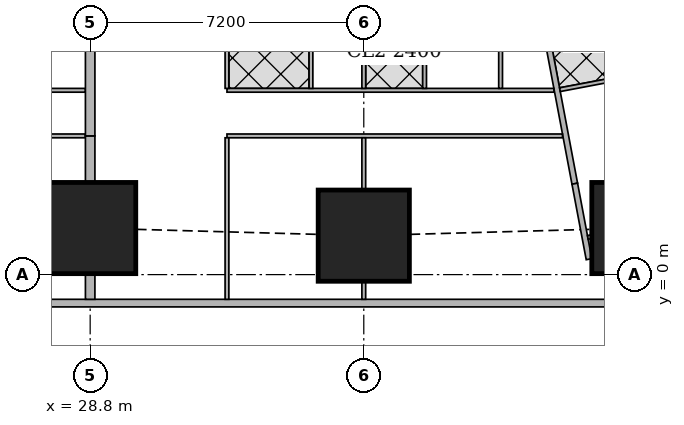
"""IFC4 building model, lengths in metres.
Left out: names, types, materials, properties, quantities, classifications, styles, units other than length and angle.
Written with IfcOpenShell. Run it as: python <this file> out.ifc"""

import sys

from ifc_helpers import new_model, si_unit, direction, frame, frame_2d, origin, origin_2d, place, context, subcontext, project, spatial, rectangle, extrude, element, fill, save


model = new_model("IFC4")
c1 = context("Model", 3, precision=1e-05, world=origin(), true_north=direction((0.0, 1.0)))
c2 = subcontext(c1, "Body", "Model", "MODEL_VIEW")
j1 = project(units=[si_unit("LENGTHUNIT", "METRE"), si_unit("PLANEANGLEUNIT", "RADIAN")], contexts=[c1])
p1 = place(None, origin())
s1 = spatial("IfcSite", under=j1, at=p1, CompositionType="ELEMENT")
p2 = place(p1, origin())
s2 = spatial("IfcBuilding", under=s1, at=p2, CompositionType="ELEMENT")
p3 = place(p2, frame((0.0, 0.0, 193.7)))
s3 = spatial("IfcBuildingStorey", under=s2, at=p3, CompositionType="ELEMENT", Elevation=193.7)
for number, where, z_axis, x_axis in (
    (1, (28.8, 1.225, 0.0), (0.0, 0.0, 1.0), (1.0, 0.0, 0.0)),
    (2, (36.0, 1.025, 0.0), (0.0, 0.0, 1.0), (1.0, 0.0, 0.0)),
    (3, (43.2, 1.225, 0.0), (0.0, 0.0, 1.0), (1.0, 0.0, 0.0)),
):
    element("IfcColumn", number, at=place(p3, frame(where, z_axis=z_axis, x_axis=x_axis)), inside=s3, PredefinedType="COLUMN", context=c2, shape_type="SweptSolid", body=[
        extrude(rectangle(XDim=2.4, YDim=2.4, at=origin_2d()), origin(), (0.0, 0.0, 1.0), 3.75),
    ])
p4 = place(p3, frame((7.363, -0.75, 0.0), z_axis=(0.0, 0.0, 1.0), x_axis=(1.0, 0.0, 0.0)))
e4 = element("IfcWall", 4, at=p4, inside=s3, PredefinedType="SOLIDWALL", context=c2, shape_type="SweptSolid", body=[
    extrude(rectangle(XDim=40.428, YDim=0.2, at=frame_2d((20.214, 0.0))), origin(), (0.0, 0.0, 1.0), 3.5),
])
p5 = place(p4, frame((2.319, 0.0, 0.9)))
e5 = element("IfcOpeningElement", 5, at=p5, cuts=e4, PredefinedType="OPENING", context=c2, shape_type="SweptSolid", body=[
    extrude(rectangle(XDim=2.4, YDim=1.5, at=frame_2d((1.2, 0.75))), frame((0.0, 0.11, 0.0), z_axis=(0.0, -1.0, 0.0), x_axis=(1.0, 0.0, 0.0)), (0.0, 0.0, 1.0), 0.22),
])
p6 = place(p4, frame((7.937, 0.0, 0.9)))
e6 = element("IfcOpeningElement", 6, at=p6, cuts=e4, PredefinedType="OPENING", context=c2, shape_type="SweptSolid", body=[
    extrude(rectangle(XDim=1.8, YDim=1.5, at=frame_2d((0.9, 0.75))), frame((0.0, 0.11, 0.0), z_axis=(0.0, -1.0, 0.0), x_axis=(1.0, 0.0, 0.0)), (0.0, 0.0, 1.0), 0.22),
])
p7 = place(p4, frame((11.537, 0.0, 0.9)))
e7 = element("IfcOpeningElement", 7, at=p7, cuts=e4, PredefinedType="OPENING", context=c2, shape_type="SweptSolid", body=[
    extrude(rectangle(XDim=1.8, YDim=1.5, at=frame_2d((0.9, 0.75))), frame((0.0, 0.11, 0.0), z_axis=(0.0, -1.0, 0.0), x_axis=(1.0, 0.0, 0.0)), (0.0, 0.0, 1.0), 0.22),
])
p8 = place(p4, frame((15.137, 0.0, 0.9)))
e8 = element("IfcOpeningElement", 8, at=p8, cuts=e4, PredefinedType="OPENING", context=c2, shape_type="SweptSolid", body=[
    extrude(rectangle(XDim=1.8, YDim=1.5, at=frame_2d((0.9, 0.75))), frame((0.0, 0.11, 0.0), z_axis=(0.0, -1.0, 0.0), x_axis=(1.0, 0.0, 0.0)), (0.0, 0.0, 1.0), 0.22),
])
p9 = place(p4, frame((18.737, 0.0, 0.9)))
e9 = element("IfcOpeningElement", 9, at=p9, cuts=e4, PredefinedType="OPENING", context=c2, shape_type="SweptSolid", body=[
    extrude(rectangle(XDim=1.8, YDim=1.5, at=frame_2d((0.9, 0.75))), frame((0.0, 0.11, 0.0), z_axis=(0.0, -1.0, 0.0), x_axis=(1.0, 0.0, 0.0)), (0.0, 0.0, 1.0), 0.22),
])
p10 = place(p4, frame((22.337, 0.0, 0.9)))
e10 = element("IfcOpeningElement", 10, at=p10, cuts=e4, PredefinedType="OPENING", context=c2, shape_type="SweptSolid", body=[
    extrude(rectangle(XDim=1.8, YDim=1.5, at=frame_2d((0.9, 0.75))), frame((0.0, 0.11, 0.0), z_axis=(0.0, -1.0, 0.0), x_axis=(1.0, 0.0, 0.0)), (0.0, 0.0, 1.0), 0.22),
])
p11 = place(p4, frame((25.937, 0.0, 0.9)))
e11 = element("IfcOpeningElement", 11, at=p11, cuts=e4, PredefinedType="OPENING", context=c2, shape_type="SweptSolid", body=[
    extrude(rectangle(XDim=1.8, YDim=1.5, at=frame_2d((0.9, 0.75))), frame((0.0, 0.11, 0.0), z_axis=(0.0, -1.0, 0.0), x_axis=(1.0, 0.0, 0.0)), (0.0, 0.0, 1.0), 0.22),
])
p12 = place(p4, frame((29.537, 0.0, 0.9)))
e12 = element("IfcOpeningElement", 12, at=p12, cuts=e4, PredefinedType="OPENING", context=c2, shape_type="SweptSolid", body=[
    extrude(rectangle(XDim=1.8, YDim=1.5, at=frame_2d((0.9, 0.75))), frame((0.0, 0.11, 0.0), z_axis=(0.0, -1.0, 0.0), x_axis=(1.0, 0.0, 0.0)), (0.0, 0.0, 1.0), 0.22),
])
p13 = place(p4, frame((33.137, 0.0, 0.9)))
e13 = element("IfcOpeningElement", 13, at=p13, cuts=e4, PredefinedType="OPENING", context=c2, shape_type="SweptSolid", body=[
    extrude(rectangle(XDim=1.8, YDim=1.5, at=frame_2d((0.9, 0.75))), frame((0.0, 0.11, 0.0), z_axis=(0.0, -1.0, 0.0), x_axis=(1.0, 0.0, 0.0)), (0.0, 0.0, 1.0), 0.22),
])
p14 = place(p3, frame((33.933, 42.73, 0.0), z_axis=(0.0, 0.0, 1.0), x_axis=(0.185595417643, -0.982626246825, 0.0)))
e14 = element("IfcWall", 14, at=p14, inside=s3, PredefinedType="SOLIDWALL", context=c2, shape_type="SweptSolid", body=[
    extrude(rectangle(XDim=41.051, YDim=0.15, at=frame_2d((20.525, 0.0))), origin(), (0.0, 0.0, 1.0), 2.5),
])
p15 = place(p14, frame((16.082, 0.0, 0.0)))
e15 = element("IfcOpeningElement", 15, at=p15, cuts=e14, PredefinedType="OPENING", context=c2, shape_type="SweptSolid", body=[
    extrude(rectangle(XDim=1.0, YDim=2.1, at=frame_2d((0.5, 1.05))), frame((0.0, 0.085, 0.0), z_axis=(0.0, -1.0, 0.0), x_axis=(1.0, 0.0, 0.0)), (0.0, 0.0, 1.0), 0.17),
])
p16 = place(p14, frame((19.898, 0.0, 0.0)))
e16 = element("IfcOpeningElement", 16, at=p16, cuts=e14, PredefinedType="OPENING", context=c2, shape_type="SweptSolid", body=[
    extrude(rectangle(XDim=1.0, YDim=2.1, at=frame_2d((0.5, 1.05))), frame((0.0, 0.085, 0.0), z_axis=(0.0, -1.0, 0.0), x_axis=(1.0, 0.0, 0.0)), (0.0, 0.0, 1.0), 0.17),
])
p17 = place(p14, frame((30.862, 0.0, 0.0)))
e17 = element("IfcOpeningElement", 17, at=p17, cuts=e14, PredefinedType="OPENING", context=c2, shape_type="SweptSolid", body=[
    extrude(rectangle(XDim=1.0, YDim=2.1, at=frame_2d((0.5, 1.05))), frame((0.0, 0.085, 0.0), z_axis=(0.0, -1.0, 0.0), x_axis=(1.0, 0.0, 0.0)), (0.0, 0.0, 1.0), 0.17),
])
p18 = place(p3, frame((41.552, 2.392, 0.0), z_axis=(0.0, 0.0, 1.0), x_axis=(0.185535500323, -0.982637561932, 0.0)))
e18 = element("IfcWall", 18, at=p18, inside=s3, PredefinedType="SOLIDWALL", context=c2, shape_type="SweptSolid", body=[
    extrude(rectangle(XDim=2.021, YDim=0.15, at=frame_2d((1.011, 0.0))), origin(), (0.0, 0.0, 1.0), 2.05),
])
p19 = place(p3, frame((28.675, 3.65, 0.0), z_axis=(0.0, 0.0, 1.0), x_axis=(-1.0, 0.0, 0.0)))
e19 = element("IfcWall", 19, at=p19, inside=s3, PredefinedType="PARTITIONING", context=c2, shape_type="SweptSolid", body=[
    extrude(rectangle(XDim=10.675, YDim=0.1, at=frame_2d((5.337, 0.0))), origin(), (0.0, 0.0, 1.0), 3.5),
])
p20 = place(p19, frame((9.575, 0.0, 0.0)))
e20 = element("IfcOpeningElement", 20, at=p20, cuts=e19, PredefinedType="OPENING", context=c2, shape_type="SweptSolid", body=[
    extrude(rectangle(XDim=0.9, YDim=2.1, at=frame_2d((0.45, 1.05))), frame((0.0, 0.06, 0.0), z_axis=(0.0, -1.0, 0.0), x_axis=(1.0, 0.0, 0.0)), (0.0, 0.0, 1.0), 0.12),
])
p21 = place(p19, frame((5.975, 0.0, 0.0)))
e21 = element("IfcOpeningElement", 21, at=p21, cuts=e19, PredefinedType="OPENING", context=c2, shape_type="SweptSolid", body=[
    extrude(rectangle(XDim=0.9, YDim=2.1, at=frame_2d((0.45, 1.05))), frame((0.0, 0.06, 0.0), z_axis=(0.0, -1.0, 0.0), x_axis=(1.0, 0.0, 0.0)), (0.0, 0.0, 1.0), 0.12),
])
p22 = place(p19, frame((2.375, 0.0, 0.0)))
e22 = element("IfcOpeningElement", 22, at=p22, cuts=e19, PredefinedType="OPENING", context=c2, shape_type="SweptSolid", body=[
    extrude(rectangle(XDim=0.9, YDim=2.1, at=frame_2d((0.45, 1.05))), frame((0.0, 0.06, 0.0), z_axis=(0.0, -1.0, 0.0), x_axis=(1.0, 0.0, 0.0)), (0.0, 0.0, 1.0), 0.12),
])
p23 = place(p3, frame((28.675, 4.85, 0.0), z_axis=(0.0, 0.0, 1.0), x_axis=(-1.0, 0.0, 0.0)))
e23 = element("IfcWall", 23, at=p23, inside=s3, PredefinedType="PARTITIONING", context=c2, shape_type="SweptSolid", body=[
    extrude(rectangle(XDim=10.675, YDim=0.1, at=frame_2d((5.337, 0.0))), origin(), (0.0, 0.0, 1.0), 3.5),
])
p24 = place(p23, frame((9.12, 0.0, 0.0)))
e24 = element("IfcOpeningElement", 24, at=p24, cuts=e23, PredefinedType="OPENING", context=c2, shape_type="SweptSolid", body=[
    extrude(rectangle(XDim=0.9, YDim=2.1, at=frame_2d((0.45, 1.05))), frame((0.0, 0.06, 0.0), z_axis=(0.0, -1.0, 0.0), x_axis=(1.0, 0.0, 0.0)), (0.0, 0.0, 1.0), 0.12),
])
p25 = place(p23, frame((5.825, 0.0, 0.0)))
e25 = element("IfcOpeningElement", 25, at=p25, cuts=e23, PredefinedType="OPENING", context=c2, shape_type="SweptSolid", body=[
    extrude(rectangle(XDim=0.9, YDim=2.1, at=frame_2d((0.45, 1.05))), frame((0.0, 0.06, 0.0), z_axis=(0.0, -1.0, 0.0), x_axis=(1.0, 0.0, 0.0)), (0.0, 0.0, 1.0), 0.12),
])
p26 = place(p23, frame((2.115, 0.0, 0.0)))
e26 = element("IfcOpeningElement", 26, at=p26, cuts=e23, PredefinedType="OPENING", context=c2, shape_type="SweptSolid", body=[
    extrude(rectangle(XDim=0.9, YDim=2.1, at=frame_2d((0.45, 1.05))), frame((0.0, 0.06, 0.0), z_axis=(0.0, -1.0, 0.0), x_axis=(1.0, 0.0, 0.0)), (0.0, 0.0, 1.0), 0.12),
])
p27 = place(p23, frame((7.32, 0.0, 0.0)))
e27 = element("IfcOpeningElement", 27, at=p27, cuts=e23, PredefinedType="OPENING", context=c2, shape_type="SweptSolid", body=[
    extrude(rectangle(XDim=0.9, YDim=2.1, at=frame_2d((0.45, 1.05))), frame((0.0, 0.06, 0.0), z_axis=(0.0, -1.0, 0.0), x_axis=(1.0, 0.0, 0.0)), (0.0, 0.0, 1.0), 0.12),
])
p28 = place(p23, frame((4.025, 0.0, 0.0)))
e28 = element("IfcOpeningElement", 28, at=p28, cuts=e23, PredefinedType="OPENING", context=c2, shape_type="SweptSolid", body=[
    extrude(rectangle(XDim=0.9, YDim=2.1, at=frame_2d((0.45, 1.05))), frame((0.0, 0.06, 0.0), z_axis=(0.0, -1.0, 0.0), x_axis=(1.0, 0.0, 0.0)), (0.0, 0.0, 1.0), 0.12),
])
p29 = place(p23, frame((0.315, 0.0, 0.0)))
e29 = element("IfcOpeningElement", 29, at=p29, cuts=e23, PredefinedType="OPENING", context=c2, shape_type="SweptSolid", body=[
    extrude(rectangle(XDim=0.9, YDim=2.1, at=frame_2d((0.45, 1.05))), frame((0.0, 0.06, 0.0), z_axis=(0.0, -1.0, 0.0), x_axis=(1.0, 0.0, 0.0)), (0.0, 0.0, 1.0), 0.12),
])
p30 = place(p3, frame((41.229, 3.65, 0.0), z_axis=(0.0, 0.0, 1.0), x_axis=(-1.0, 0.0, 0.0)))
e30 = element("IfcWall", 30, at=p30, inside=s3, PredefinedType="PARTITIONING", context=c2, shape_type="SweptSolid", body=[
    extrude(rectangle(XDim=8.829, YDim=0.1, at=frame_2d((4.415, 0.0))), origin(), (0.0, 0.0, 1.0), 3.5),
])
p31 = place(p30, frame((7.729, 0.0, 0.0)))
e31 = element("IfcOpeningElement", 31, at=p31, cuts=e30, PredefinedType="OPENING", context=c2, shape_type="SweptSolid", body=[
    extrude(rectangle(XDim=0.9, YDim=2.1, at=frame_2d((0.45, 1.05))), frame((0.0, 0.06, 0.0), z_axis=(0.0, -1.0, 0.0), x_axis=(1.0, 0.0, 0.0)), (0.0, 0.0, 1.0), 0.12),
])
p32 = place(p30, frame((4.129, 0.0, 0.0)))
e32 = element("IfcOpeningElement", 32, at=p32, cuts=e30, PredefinedType="OPENING", context=c2, shape_type="SweptSolid", body=[
    extrude(rectangle(XDim=0.9, YDim=2.1, at=frame_2d((0.45, 1.05))), frame((0.0, 0.06, 0.0), z_axis=(0.0, -1.0, 0.0), x_axis=(1.0, 0.0, 0.0)), (0.0, 0.0, 1.0), 0.12),
])
p33 = place(p3, frame((41.002, 4.85, 0.0), z_axis=(0.0, 0.0, 1.0), x_axis=(-1.0, 0.0, 0.0)))
e33 = element("IfcWall", 33, at=p33, inside=s3, PredefinedType="PARTITIONING", context=c2, shape_type="SweptSolid", body=[
    extrude(rectangle(XDim=8.602, YDim=0.1, at=frame_2d((4.301, 0.0))), origin(), (0.0, 0.0, 1.0), 3.5),
])
p34 = place(p33, frame((7.047, 0.0, 0.0)))
e34 = element("IfcOpeningElement", 34, at=p34, cuts=e33, PredefinedType="OPENING", context=c2, shape_type="SweptSolid", body=[
    extrude(rectangle(XDim=0.9, YDim=2.1, at=frame_2d((0.45, 1.05))), frame((0.0, 0.06, 0.0), z_axis=(0.0, -1.0, 0.0), x_axis=(1.0, 0.0, 0.0)), (0.0, 0.0, 1.0), 0.12),
])
p35 = place(p33, frame((3.752, 0.0, 0.0)))
e35 = element("IfcOpeningElement", 35, at=p35, cuts=e33, PredefinedType="OPENING", context=c2, shape_type="SweptSolid", body=[
    extrude(rectangle(XDim=0.9, YDim=2.1, at=frame_2d((0.45, 1.05))), frame((0.0, 0.06, 0.0), z_axis=(0.0, -1.0, 0.0), x_axis=(1.0, 0.0, 0.0)), (0.0, 0.0, 1.0), 0.12),
])
p36 = place(p33, frame((0.15, 0.0, 0.0)))
e36 = element("IfcOpeningElement", 36, at=p36, cuts=e33, PredefinedType="OPENING", context=c2, shape_type="SweptSolid", body=[
    extrude(rectangle(XDim=0.9, YDim=2.1, at=frame_2d((0.45, 1.05))), frame((0.0, 0.06, 0.0), z_axis=(0.0, -1.0, 0.0), x_axis=(1.0, 0.0, 0.0)), (0.0, 0.0, 1.0), 0.12),
])
p37 = place(p33, frame((5.247, 0.0, 0.0)))
e37 = element("IfcOpeningElement", 37, at=p37, cuts=e33, PredefinedType="OPENING", context=c2, shape_type="SweptSolid", body=[
    extrude(rectangle(XDim=0.9, YDim=2.1, at=frame_2d((0.45, 1.05))), frame((0.0, 0.06, 0.0), z_axis=(0.0, -1.0, 0.0), x_axis=(1.0, 0.0, 0.0)), (0.0, 0.0, 1.0), 0.12),
])
p38 = place(p33, frame((1.952, 0.0, 0.0)))
e38 = element("IfcOpeningElement", 38, at=p38, cuts=e33, PredefinedType="OPENING", context=c2, shape_type="SweptSolid", body=[
    extrude(rectangle(XDim=0.9, YDim=2.1, at=frame_2d((0.45, 1.05))), frame((0.0, 0.06, 0.0), z_axis=(0.0, -1.0, 0.0), x_axis=(1.0, 0.0, 0.0)), (0.0, 0.0, 1.0), 0.12),
])
p39 = place(p3, frame((32.4, -0.65, 0.0), z_axis=(0.0, 0.0, 1.0), x_axis=(0.0, 1.0, 0.0)))
e39 = element("IfcWall", 39, at=p39, inside=s3, PredefinedType="PARTITIONING", context=c2, shape_type="SweptSolid", body=[
    extrude(rectangle(XDim=4.25, YDim=0.1, at=frame_2d((2.125, 0.0))), origin(), (0.0, 0.0, 1.0), 2.05),
])
p40 = place(p3, frame((36.0, -0.65, 0.0), z_axis=(0.0, 0.0, 1.0), x_axis=(0.0, 1.0, 0.0)))
e40 = element("IfcWall", 40, at=p40, inside=s3, PredefinedType="PARTITIONING", context=c2, shape_type="SweptSolid", body=[
    extrude(rectangle(XDim=0.474, YDim=0.1, at=frame_2d((0.237, 0.0))), origin(), (0.0, 0.0, 1.0), 3.5),
])
p41 = place(p3, frame((36.0, 2.226, 0.0), z_axis=(0.0, 0.0, 1.0), x_axis=(0.0, 1.0, 0.0)))
e41 = element("IfcWall", 41, at=p41, inside=s3, PredefinedType="PARTITIONING", context=c2, shape_type="SweptSolid", body=[
    extrude(rectangle(XDim=1.374, YDim=0.1, at=frame_2d((0.687, 0.0))), origin(), (0.0, 0.0, 1.0), 3.5),
])
p42 = place(p3, frame((32.4, 4.9, 0.0), z_axis=(0.0, 0.0, 1.0), x_axis=(0.0, 1.0, 0.0)))
e42 = element("IfcWall", 42, at=p42, inside=s3, PredefinedType="PARTITIONING", context=c2, shape_type="SweptSolid", body=[
    extrude(rectangle(XDim=3.275, YDim=0.1, at=frame_2d((1.638, 0.0))), origin(), (0.0, 0.0, 1.0), 3.5),
])
p43 = place(p3, frame((36.0, 4.9, 0.0), z_axis=(0.0, 0.0, 1.0), x_axis=(0.0, 1.0, 0.0)))
e43 = element("IfcWall", 43, at=p43, inside=s3, PredefinedType="PARTITIONING", context=c2, shape_type="SweptSolid", body=[
    extrude(rectangle(XDim=1.899, YDim=0.1, at=frame_2d((0.95, 0.0))), origin(), (0.0, 0.0, 1.0), 3.5),
])
for number, where, z_axis, x_axis in (
    (44, (39.6, 4.9, 0.0), (0.0, 0.0, 1.0), (0.0, 1.0, 0.0)),
    (45, (34.61, 4.9, 0.0), (0.0, 0.0, 1.0), (0.0, 1.0, 0.0)),
    (46, (37.6, 4.9, 0.0), (0.0, 0.0, 1.0), (0.0, 1.0, 0.0)),
):
    element("IfcWall", number, at=place(p3, frame(where, z_axis=z_axis, x_axis=x_axis)), inside=s3, PredefinedType="PARTITIONING", context=c2, shape_type="SweptSolid", body=[
        extrude(rectangle(XDim=3.275, YDim=0.1, at=frame_2d((1.638, 0.0))), origin(), (0.0, 0.0, 1.0), 3.5),
    ])
p44 = place(p3, frame((28.8, -0.65, 0.0), z_axis=(0.0, 0.0, 1.0), x_axis=(0.0, 1.0, 0.0)))
e47 = element("IfcWall", 47, at=p44, inside=s3, PredefinedType="SOLIDWALL", context=c2, shape_type="SweptSolid", body=[
    extrude(rectangle(XDim=0.674, YDim=0.25, at=frame_2d((0.337, 0.0))), origin(), (0.0, 0.0, 1.0), 2.05),
])
p45 = place(p3, frame((28.8, 2.426, 0.0), z_axis=(0.0, 0.0, 1.0), x_axis=(0.0, 1.0, 0.0)))
e48 = element("IfcWall", 48, at=p45, inside=s3, PredefinedType="SOLIDWALL", context=c2, shape_type="SweptSolid", body=[
    extrude(rectangle(XDim=1.224, YDim=0.25, at=frame_2d((0.612, 0.0))), origin(), (0.0, 0.0, 1.0), 2.05),
])
p46 = place(p3, frame((28.8, 3.65, 0.0), z_axis=(0.0, 0.0, 1.0), x_axis=(0.0, 1.0, 0.0)))
e49 = element("IfcWall", 49, at=p46, inside=s3, PredefinedType="SOLIDWALL", context=c2, shape_type="SweptSolid", body=[
    extrude(rectangle(XDim=3.149, YDim=0.25, at=frame_2d((1.575, 0.0))), origin(), (0.0, 0.0, 1.0), 3.5),
])
p47 = place(p3, frame((41.99, 0.997, 0.0), z_axis=(0.0, 0.0, 1.0), x_axis=(-0.982382747416, -0.186880008506, 0.0)))
e50 = element("IfcWall", 50, at=p47, inside=s3, PredefinedType="PARTITIONING", context=c2, shape_type="SweptSolid", body=[
    extrude(rectangle(XDim=0.097, YDim=0.1, at=frame_2d((0.048, 0.0))), origin(), (0.0, 0.0, 1.0), 2.05),
])
p48 = place(p3, frame((44.379, 5.474, 0.0), z_axis=(0.0, 0.0, 1.0), x_axis=(-0.982607026909, -0.185697147715, 0.0)))
e51 = element("IfcWall", 51, at=p48, inside=s3, PredefinedType="PARTITIONING", context=c2, shape_type="SweptSolid", body=[
    extrude(rectangle(XDim=3.275, YDim=0.1, at=frame_2d((1.637, 0.0))), origin(), (0.0, 0.0, 1.0), 3.5),
])
p49 = place(p9, origin())
e52 = element("IfcWindow", 52, at=p49, inside=s3, PartitioningType="SINGLE_PANEL", PredefinedType="WINDOW", context=c2, shape_type="SweptSolid", body=[
    extrude(rectangle(XDim=1.8, YDim=1.5, at=frame_2d((0.9, 0.75))), frame((0.0, 0.03, 0.0), z_axis=(0.0, -1.0, 0.0), x_axis=(1.0, 0.0, 0.0)), (0.0, 0.0, 1.0), 0.06),
])
fill(e9, e52)
p50 = place(p10, origin())
e53 = element("IfcWindow", 53, at=p50, inside=s3, PartitioningType="SINGLE_PANEL", PredefinedType="WINDOW", context=c2, shape_type="SweptSolid", body=[
    extrude(rectangle(XDim=1.8, YDim=1.5, at=frame_2d((0.9, 0.75))), frame((0.0, 0.03, 0.0), z_axis=(0.0, -1.0, 0.0), x_axis=(1.0, 0.0, 0.0)), (0.0, 0.0, 1.0), 0.06),
])
fill(e10, e53)
p51 = place(p11, origin())
e54 = element("IfcWindow", 54, at=p51, inside=s3, PartitioningType="SINGLE_PANEL", PredefinedType="WINDOW", context=c2, shape_type="SweptSolid", body=[
    extrude(rectangle(XDim=1.8, YDim=1.5, at=frame_2d((0.9, 0.75))), frame((0.0, 0.03, 0.0), z_axis=(0.0, -1.0, 0.0), x_axis=(1.0, 0.0, 0.0)), (0.0, 0.0, 1.0), 0.06),
])
fill(e11, e54)
p52 = place(p12, origin())
e55 = element("IfcWindow", 55, at=p52, inside=s3, PartitioningType="SINGLE_PANEL", PredefinedType="WINDOW", context=c2, shape_type="SweptSolid", body=[
    extrude(rectangle(XDim=1.8, YDim=1.5, at=frame_2d((0.9, 0.75))), frame((0.0, 0.03, 0.0), z_axis=(0.0, -1.0, 0.0), x_axis=(1.0, 0.0, 0.0)), (0.0, 0.0, 1.0), 0.06),
])
fill(e12, e55)
p53 = place(p13, origin())
e56 = element("IfcWindow", 56, at=p53, inside=s3, PartitioningType="SINGLE_PANEL", PredefinedType="WINDOW", context=c2, shape_type="SweptSolid", body=[
    extrude(rectangle(XDim=1.8, YDim=1.5, at=frame_2d((0.9, 0.75))), frame((0.0, 0.03, 0.0), z_axis=(0.0, -1.0, 0.0), x_axis=(1.0, 0.0, 0.0)), (0.0, 0.0, 1.0), 0.06),
])
fill(e13, e56)
p54 = place(p29, origin())
e57 = element("IfcDoor", 57, at=p54, inside=s3, OperationType="SINGLE_SWING_RIGHT", PredefinedType="DOOR", context=c2, shape_type="SweptSolid", body=[
    extrude(rectangle(XDim=0.9, YDim=2.1, at=frame_2d((0.45, 1.05))), frame((0.0, 0.025, 0.0), z_axis=(0.0, -1.0, 0.0), x_axis=(1.0, 0.0, 0.0)), (0.0, 0.0, 1.0), 0.05),
])
fill(e29, e57)
p55 = place(p31, origin())
e58 = element("IfcDoor", 58, at=p55, inside=s3, OperationType="SINGLE_SWING_RIGHT", PredefinedType="DOOR", context=c2, shape_type="SweptSolid", body=[
    extrude(rectangle(XDim=0.9, YDim=2.1, at=frame_2d((0.45, 1.05))), frame((0.0, 0.025, 0.0), z_axis=(0.0, -1.0, 0.0), x_axis=(1.0, 0.0, 0.0)), (0.0, 0.0, 1.0), 0.05),
])
fill(e31, e58)
p56 = place(p32, origin())
e59 = element("IfcDoor", 59, at=p56, inside=s3, OperationType="SINGLE_SWING_RIGHT", PredefinedType="DOOR", context=c2, shape_type="SweptSolid", body=[
    extrude(rectangle(XDim=0.9, YDim=2.1, at=frame_2d((0.45, 1.05))), frame((0.0, 0.025, 0.0), z_axis=(0.0, -1.0, 0.0), x_axis=(1.0, 0.0, 0.0)), (0.0, 0.0, 1.0), 0.05),
])
fill(e32, e59)
p57 = place(p34, origin())
e60 = element("IfcDoor", 60, at=p57, inside=s3, OperationType="SINGLE_SWING_LEFT", PredefinedType="DOOR", context=c2, shape_type="SweptSolid", body=[
    extrude(rectangle(XDim=0.9, YDim=2.1, at=frame_2d((0.45, 1.05))), frame((0.0, 0.025, 0.0), z_axis=(0.0, -1.0, 0.0), x_axis=(1.0, 0.0, 0.0)), (0.0, 0.0, 1.0), 0.05),
])
fill(e34, e60)
p58 = place(p35, origin())
e61 = element("IfcDoor", 61, at=p58, inside=s3, OperationType="SINGLE_SWING_LEFT", PredefinedType="DOOR", context=c2, shape_type="SweptSolid", body=[
    extrude(rectangle(XDim=0.9, YDim=2.1, at=frame_2d((0.45, 1.05))), frame((0.0, 0.025, 0.0), z_axis=(0.0, -1.0, 0.0), x_axis=(1.0, 0.0, 0.0)), (0.0, 0.0, 1.0), 0.05),
])
fill(e35, e61)
p59 = place(p36, origin())
e62 = element("IfcDoor", 62, at=p59, inside=s3, OperationType="SINGLE_SWING_RIGHT", PredefinedType="DOOR", context=c2, shape_type="SweptSolid", body=[
    extrude(rectangle(XDim=0.9, YDim=2.1, at=frame_2d((0.45, 1.05))), frame((0.0, 0.025, 0.0), z_axis=(0.0, -1.0, 0.0), x_axis=(1.0, 0.0, 0.0)), (0.0, 0.0, 1.0), 0.05),
])
fill(e36, e62)
p60 = place(p37, origin())
e63 = element("IfcDoor", 63, at=p60, inside=s3, OperationType="SINGLE_SWING_RIGHT", PredefinedType="DOOR", context=c2, shape_type="SweptSolid", body=[
    extrude(rectangle(XDim=0.9, YDim=2.1, at=frame_2d((0.45, 1.05))), frame((0.0, 0.025, 0.0), z_axis=(0.0, -1.0, 0.0), x_axis=(1.0, 0.0, 0.0)), (0.0, 0.0, 1.0), 0.05),
])
fill(e37, e63)
p61 = place(p38, origin())
e64 = element("IfcDoor", 64, at=p61, inside=s3, OperationType="SINGLE_SWING_RIGHT", PredefinedType="DOOR", context=c2, shape_type="SweptSolid", body=[
    extrude(rectangle(XDim=0.9, YDim=2.1, at=frame_2d((0.45, 1.05))), frame((0.0, 0.025, 0.0), z_axis=(0.0, -1.0, 0.0), x_axis=(1.0, 0.0, 0.0)), (0.0, 0.0, 1.0), 0.05),
])
fill(e38, e64)
save(model, sys.argv[1])
